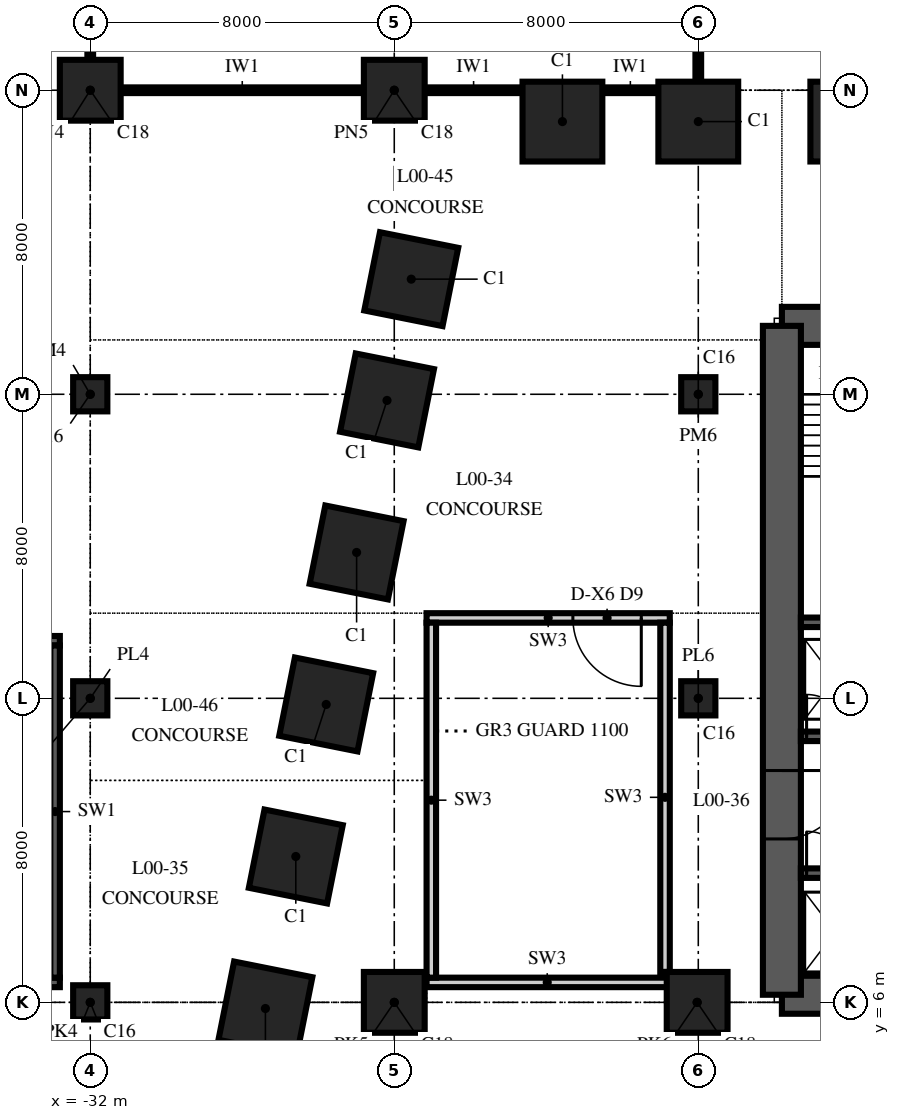
"""IFC4 building model, lengths in metres.
Left out: names, types, materials, properties, quantities, classifications, styles, units other than length and angle.
Written with IfcOpenShell. Run it as: python <this file> out.ifc"""

import sys

from ifc_helpers import new_model, si_unit, direction, frame, frame_2d, origin, origin_2d, place, context, subcontext, project, spatial, polyline, rectangle, outline, extrude, element, fill, save


model = new_model("IFC4")
c1 = context("Model", 3, precision=1e-05, world=origin(), true_north=direction((0.0, 1.0)))
c2 = subcontext(c1, "Body", "Model", "MODEL_VIEW")
j1 = project(units=[si_unit("LENGTHUNIT", "METRE"), si_unit("PLANEANGLEUNIT", "RADIAN")], contexts=[c1])
p1 = place(None, origin())
s1 = spatial("IfcSite", under=j1, at=p1, CompositionType="ELEMENT")
p2 = place(p1, origin())
s2 = spatial("IfcBuilding", under=s1, at=p2, CompositionType="ELEMENT")
p3 = place(p2, origin())
s3 = spatial("IfcBuildingStorey", under=s2, at=p3, CompositionType="ELEMENT", Elevation=0.0)
for number, where, z_axis, x_axis in (
    (1, (-12.0, 29.175, 0.0), (0.0, 0.0, 1.0), (-1.0, 0.0, 0.0)),
    (2, (-16.0, 29.175, 0.0), (0.0, 0.0, 1.0), (-1.0, 0.0, 0.0)),
    (3, (-19.575, 29.175, 0.0), (0.0, 0.0, 1.0), (-1.0, 0.0, 0.0)),
    (4, (-23.553, 25.029, 0.0), (0.0, 0.0, 1.0), (-0.196, -0.981, 0.0)),
    (5, (-24.191, 21.838, 0.0), (0.0, 0.0, 1.0), (-0.196, -0.981, 0.0)),
    (6, (-24.991, 17.838, 0.0), (0.0, 0.0, 1.0), (-0.196, -0.981, 0.0)),
    (7, (-25.791, 13.838, 0.0), (0.0, 0.0, 1.0), (-0.196, -0.981, 0.0)),
    (8, (-26.591, 9.838, 0.0), (0.0, 0.0, 1.0), (-0.196, -0.981, 0.0)),
    (9, (-27.391, 5.838, 0.0), (0.0, 0.0, 1.0), (-0.196, -0.981, 0.0)),
):
    element("IfcColumn", number, at=place(p3, frame(where, z_axis=z_axis, x_axis=x_axis)), inside=s3, PredefinedType="COLUMN", context=c2, shape_type="SweptSolid", body=[
        extrude(rectangle(XDim=2.1, YDim=2.1, at=origin_2d()), origin(), (0.0, 0.0, 1.0), 6.0),
    ])
for number, where, z_axis, x_axis in (
    (10, (-32.0, 6.0, 0.0), (0.0, 0.0, 1.0), (1.0, 0.0, 0.0)),
    (11, (-32.0, 14.0, 0.0), (0.0, 0.0, 1.0), (1.0, 0.0, 0.0)),
    (12, (-32.0, 22.0, 0.0), (0.0, 0.0, 1.0), (1.0, 0.0, 0.0)),
):
    element("IfcColumn", number, at=place(p3, frame(where, z_axis=z_axis, x_axis=x_axis)), inside=s3, PredefinedType="COLUMN", context=c2, shape_type="SweptSolid", body=[
        extrude(rectangle(XDim=0.9, YDim=0.9, at=origin_2d()), origin(), (0.0, 0.0, 1.0), 6.0),
    ])
for number, where, z_axis, x_axis in (
    (13, (-32.0, 30.0, 0.0), (0.0, 0.0, 1.0), (1.0, 0.0, 0.0)),
    (14, (-24.0, 6.0, 0.0), (0.0, 0.0, 1.0), (1.0, 0.0, 0.0)),
    (15, (-24.0, 30.0, 0.0), (0.0, 0.0, 1.0), (1.0, 0.0, 0.0)),
    (16, (-16.03, 6.0, 0.0), (0.0, 0.0, 1.0), (1.0, 0.0, 0.0)),
):
    element("IfcColumn", number, at=place(p3, frame(where, z_axis=z_axis, x_axis=x_axis)), inside=s3, PredefinedType="COLUMN", context=c2, shape_type="SweptSolid", body=[
        extrude(rectangle(XDim=1.6, YDim=1.6, at=origin_2d()), origin(), (0.0, 0.0, 1.0), 6.0),
    ])
for number, where, z_axis, x_axis in (
    (17, (-16.0, 14.0, 0.0), (0.0, 0.0, 1.0), (1.0, 0.0, 0.0)),
    (18, (-16.0, 22.0, 0.0), (0.0, 0.0, 1.0), (1.0, 0.0, 0.0)),
):
    element("IfcColumn", number, at=place(p3, frame(where, z_axis=z_axis, x_axis=x_axis)), inside=s3, PredefinedType="COLUMN", context=c2, shape_type="SweptSolid", body=[
        extrude(rectangle(XDim=0.9, YDim=0.9, at=origin_2d()), origin(), (0.0, 0.0, 1.0), 6.0),
    ])
p4 = place(p3, frame((-13.8, 6.2, 0.0), z_axis=(0.0, 0.0, 1.0), x_axis=(1.0, 0.0, 0.0)))
e19 = element("IfcWall", 19, at=p4, inside=s3, PredefinedType="SHEAR", context=c2, shape_type="SweptSolid", body=[
    extrude(rectangle(XDim=27.6, YDim=1.0, at=frame_2d((13.8, 0.0))), origin(), (0.0, 0.0, 1.0), 6.0),
])
p5 = place(p3, frame((13.8, 23.8, 0.0), z_axis=(0.0, 0.0, 1.0), x_axis=(-1.0, 0.0, 0.0)))
e20 = element("IfcWall", 20, at=p5, inside=s3, PredefinedType="SHEAR", context=c2, shape_type="SweptSolid", body=[
    extrude(rectangle(XDim=27.6, YDim=1.0, at=frame_2d((13.8, 0.0))), origin(), (0.0, 0.0, 1.0), 6.0),
])
p6 = place(p5, frame((21.7, 0.0, 0.0)))
e21 = element("IfcOpeningElement", 21, at=p6, cuts=e20, PredefinedType="OPENING", context=c2, shape_type="SweptSolid", body=[
    extrude(rectangle(XDim=1.0, YDim=2.1, at=frame_2d((0.5, 1.05))), frame((0.0, 0.515, 0.0), z_axis=(0.0, -1.0, 0.0), x_axis=(1.0, 0.0, 0.0)), (0.0, 0.0, 1.0), 1.03),
])
p7 = place(p5, frame((4.9, 0.0, 0.0)))
e22 = element("IfcOpeningElement", 22, at=p7, cuts=e20, PredefinedType="OPENING", context=c2, shape_type="SweptSolid", body=[
    extrude(rectangle(XDim=1.0, YDim=2.1, at=frame_2d((0.5, 1.05))), frame((0.0, 0.515, 0.0), z_axis=(0.0, -1.0, 0.0), x_axis=(1.0, 0.0, 0.0)), (0.0, 0.0, 1.0), 1.03),
])
p8 = place(p5, frame((17.3, 0.0, 0.0)))
e23 = element("IfcOpeningElement", 23, at=p8, cuts=e20, PredefinedType="OPENING", context=c2, shape_type="SweptSolid", body=[
    extrude(rectangle(XDim=1.0, YDim=2.1, at=frame_2d((0.5, 1.05))), frame((0.0, 0.515, 0.0), z_axis=(0.0, -1.0, 0.0), x_axis=(1.0, 0.0, 0.0)), (0.0, 0.0, 1.0), 1.03),
])
p9 = place(p5, frame((13.3, 0.0, 0.0)))
e24 = element("IfcOpeningElement", 24, at=p9, cuts=e20, PredefinedType="OPENING", context=c2, shape_type="SweptSolid", body=[
    extrude(rectangle(XDim=1.0, YDim=2.1, at=frame_2d((0.5, 1.05))), frame((0.0, 0.515, 0.0), z_axis=(0.0, -1.0, 0.0), x_axis=(1.0, 0.0, 0.0)), (0.0, 0.0, 1.0), 1.03),
])
p10 = place(p5, frame((9.3, 0.0, 0.0)))
e25 = element("IfcOpeningElement", 25, at=p10, cuts=e20, PredefinedType="OPENING", context=c2, shape_type="SweptSolid", body=[
    extrude(rectangle(XDim=1.0, YDim=2.1, at=frame_2d((0.5, 1.05))), frame((0.0, 0.515, 0.0), z_axis=(0.0, -1.0, 0.0), x_axis=(1.0, 0.0, 0.0)), (0.0, 0.0, 1.0), 1.03),
])
p11 = place(p3, frame((-13.8, 23.8, 0.0), z_axis=(0.0, 0.0, 1.0), x_axis=(0.0, -1.0, 0.0)))
e26 = element("IfcWall", 26, at=p11, inside=s3, PredefinedType="SHEAR", context=c2, shape_type="SweptSolid", body=[
    extrude(outline(polyline([(0.0, -0.5), (17.6, -0.5), (17.6, 0.0), (17.1, 0.0), (17.1, 0.5), (0.5, 0.5), (0.5, 0.0), (0.0, 0.0), (0.0, -0.5)])), origin(), (0.0, 0.0, 1.0), 6.0),
])
p12 = place(p11, frame((11.7, 0.0, 0.0)))
e27 = element("IfcOpeningElement", 27, at=p12, cuts=e26, PredefinedType="OPENING", context=c2, shape_type="SweptSolid", body=[
    extrude(rectangle(XDim=1.8, YDim=2.4, at=frame_2d((0.9, 1.2))), frame((0.0, 0.515, 0.0), z_axis=(0.0, -1.0, 0.0), x_axis=(1.0, 0.0, 0.0)), (0.0, 0.0, 1.0), 1.03),
])
p13 = place(p3, frame((-13.3, 9.4, 0.0), z_axis=(0.0, 0.0, 1.0), x_axis=(1.0, 0.0, 0.0)))
e28 = element("IfcWall", 28, at=p13, inside=s3, PredefinedType="SHEAR", context=c2, shape_type="SweptSolid", body=[
    extrude(rectangle(XDim=26.6, YDim=0.25, at=frame_2d((13.3, 0.0))), origin(), (0.0, 0.0, 1.0), 6.0),
])
p14 = place(p13, frame((0.15, 0.0, 0.0)))
e29 = element("IfcOpeningElement", 29, at=p14, cuts=e28, PredefinedType="OPENING", context=c2, shape_type="SweptSolid", body=[
    extrude(rectangle(XDim=1.1, YDim=2.1, at=frame_2d((0.55, 1.05))), frame((0.0, 0.14, 0.0), z_axis=(0.0, -1.0, 0.0), x_axis=(1.0, 0.0, 0.0)), (0.0, 0.0, 1.0), 0.28),
])
p15 = place(p13, frame((2.95, 0.0, 0.0)))
e30 = element("IfcOpeningElement", 30, at=p15, cuts=e28, PredefinedType="OPENING", context=c2, shape_type="SweptSolid", body=[
    extrude(rectangle(XDim=1.1, YDim=2.1, at=frame_2d((0.55, 1.05))), frame((0.0, 0.14, 0.0), z_axis=(0.0, -1.0, 0.0), x_axis=(1.0, 0.0, 0.0)), (0.0, 0.0, 1.0), 0.28),
])
p16 = place(p13, frame((5.75, 0.0, 0.0)))
e31 = element("IfcOpeningElement", 31, at=p16, cuts=e28, PredefinedType="OPENING", context=c2, shape_type="SweptSolid", body=[
    extrude(rectangle(XDim=1.1, YDim=2.1, at=frame_2d((0.55, 1.05))), frame((0.0, 0.14, 0.0), z_axis=(0.0, -1.0, 0.0), x_axis=(1.0, 0.0, 0.0)), (0.0, 0.0, 1.0), 0.28),
])
p17 = place(p13, frame((8.55, 0.0, 0.0)))
e32 = element("IfcOpeningElement", 32, at=p17, cuts=e28, PredefinedType="OPENING", context=c2, shape_type="SweptSolid", body=[
    extrude(rectangle(XDim=1.1, YDim=2.1, at=frame_2d((0.55, 1.05))), frame((0.0, 0.14, 0.0), z_axis=(0.0, -1.0, 0.0), x_axis=(1.0, 0.0, 0.0)), (0.0, 0.0, 1.0), 0.28),
])
p18 = place(p13, frame((11.35, 0.0, 0.0)))
e33 = element("IfcOpeningElement", 33, at=p18, cuts=e28, PredefinedType="OPENING", context=c2, shape_type="SweptSolid", body=[
    extrude(rectangle(XDim=1.1, YDim=2.1, at=frame_2d((0.55, 1.05))), frame((0.0, 0.14, 0.0), z_axis=(0.0, -1.0, 0.0), x_axis=(1.0, 0.0, 0.0)), (0.0, 0.0, 1.0), 0.28),
])
p19 = place(p13, frame((14.15, 0.0, 0.0)))
e34 = element("IfcOpeningElement", 34, at=p19, cuts=e28, PredefinedType="OPENING", context=c2, shape_type="SweptSolid", body=[
    extrude(rectangle(XDim=1.1, YDim=2.1, at=frame_2d((0.55, 1.05))), frame((0.0, 0.14, 0.0), z_axis=(0.0, -1.0, 0.0), x_axis=(1.0, 0.0, 0.0)), (0.0, 0.0, 1.0), 0.28),
])
p20 = place(p13, frame((16.95, 0.0, 0.0)))
e35 = element("IfcOpeningElement", 35, at=p20, cuts=e28, PredefinedType="OPENING", context=c2, shape_type="SweptSolid", body=[
    extrude(rectangle(XDim=1.1, YDim=2.1, at=frame_2d((0.55, 1.05))), frame((0.0, 0.14, 0.0), z_axis=(0.0, -1.0, 0.0), x_axis=(1.0, 0.0, 0.0)), (0.0, 0.0, 1.0), 0.28),
])
p21 = place(p13, frame((19.75, 0.0, 0.0)))
e36 = element("IfcOpeningElement", 36, at=p21, cuts=e28, PredefinedType="OPENING", context=c2, shape_type="SweptSolid", body=[
    extrude(rectangle(XDim=1.1, YDim=2.1, at=frame_2d((0.55, 1.05))), frame((0.0, 0.14, 0.0), z_axis=(0.0, -1.0, 0.0), x_axis=(1.0, 0.0, 0.0)), (0.0, 0.0, 1.0), 0.28),
])
p22 = place(p13, frame((22.55, 0.0, 0.0)))
e37 = element("IfcOpeningElement", 37, at=p22, cuts=e28, PredefinedType="OPENING", context=c2, shape_type="SweptSolid", body=[
    extrude(rectangle(XDim=1.1, YDim=2.1, at=frame_2d((0.55, 1.05))), frame((0.0, 0.14, 0.0), z_axis=(0.0, -1.0, 0.0), x_axis=(1.0, 0.0, 0.0)), (0.0, 0.0, 1.0), 0.28),
])
p23 = place(p3, frame((-13.3, 13.0, 0.0), z_axis=(0.0, 0.0, 1.0), x_axis=(1.0, 0.0, 0.0)))
e38 = element("IfcWall", 38, at=p23, inside=s3, PredefinedType="SHEAR", context=c2, shape_type="SweptSolid", body=[
    extrude(rectangle(XDim=26.6, YDim=0.25, at=frame_2d((13.3, 0.0))), origin(), (0.0, 0.0, 1.0), 6.0),
])
p24 = place(p23, frame((0.15, 0.0, 0.0)))
e39 = element("IfcOpeningElement", 39, at=p24, cuts=e38, PredefinedType="OPENING", context=c2, shape_type="SweptSolid", body=[
    extrude(rectangle(XDim=1.1, YDim=2.1, at=frame_2d((0.55, 1.05))), frame((0.0, 0.14, 0.0), z_axis=(0.0, -1.0, 0.0), x_axis=(1.0, 0.0, 0.0)), (0.0, 0.0, 1.0), 0.28),
])
p25 = place(p23, frame((8.55, 0.0, 0.0)))
e40 = element("IfcOpeningElement", 40, at=p25, cuts=e38, PredefinedType="OPENING", context=c2, shape_type="SweptSolid", body=[
    extrude(rectangle(XDim=1.1, YDim=2.1, at=frame_2d((0.55, 1.05))), frame((0.0, 0.14, 0.0), z_axis=(0.0, -1.0, 0.0), x_axis=(1.0, 0.0, 0.0)), (0.0, 0.0, 1.0), 0.28),
])
p26 = place(p23, frame((11.95, 0.0, 0.0)))
e41 = element("IfcOpeningElement", 41, at=p26, cuts=e38, PredefinedType="OPENING", context=c2, shape_type="SweptSolid", body=[
    extrude(rectangle(XDim=1.1, YDim=2.1, at=frame_2d((0.55, 1.05))), frame((0.0, 0.14, 0.0), z_axis=(0.0, -1.0, 0.0), x_axis=(1.0, 0.0, 0.0)), (0.0, 0.0, 1.0), 0.28),
])
p27 = place(p23, frame((15.05, 0.0, 0.0)))
e42 = element("IfcOpeningElement", 42, at=p27, cuts=e38, PredefinedType="OPENING", context=c2, shape_type="SweptSolid", body=[
    extrude(rectangle(XDim=0.9, YDim=2.1, at=frame_2d((0.45, 1.05))), frame((0.0, 0.14, 0.0), z_axis=(0.0, -1.0, 0.0), x_axis=(1.0, 0.0, 0.0)), (0.0, 0.0, 1.0), 0.28),
])
p28 = place(p23, frame((17.45, 0.0, 0.0)))
e43 = element("IfcOpeningElement", 43, at=p28, cuts=e38, PredefinedType="OPENING", context=c2, shape_type="SweptSolid", body=[
    extrude(rectangle(XDim=0.9, YDim=2.1, at=frame_2d((0.45, 1.05))), frame((0.0, 0.14, 0.0), z_axis=(0.0, -1.0, 0.0), x_axis=(1.0, 0.0, 0.0)), (0.0, 0.0, 1.0), 0.28),
])
p29 = place(p23, frame((20.85, 0.0, 0.0)))
e44 = element("IfcOpeningElement", 44, at=p29, cuts=e38, PredefinedType="OPENING", context=c2, shape_type="SweptSolid", body=[
    extrude(rectangle(XDim=0.9, YDim=2.1, at=frame_2d((0.45, 1.05))), frame((0.0, 0.14, 0.0), z_axis=(0.0, -1.0, 0.0), x_axis=(1.0, 0.0, 0.0)), (0.0, 0.0, 1.0), 0.28),
])
p30 = place(p3, frame((-13.3, 16.0, 0.0), z_axis=(0.0, 0.0, 1.0), x_axis=(1.0, 0.0, 0.0)))
e45 = element("IfcWall", 45, at=p30, inside=s3, PredefinedType="SHEAR", context=c2, shape_type="SweptSolid", body=[
    extrude(rectangle(XDim=26.6, YDim=0.25, at=frame_2d((13.3, 0.0))), origin(), (0.0, 0.0, 1.0), 6.0),
])
p31 = place(p3, frame((-23.15, 6.525, 0.0), z_axis=(0.0, 0.0, 1.0), x_axis=(1.0, 0.0, 0.0)))
e46 = element("IfcWall", 46, at=p31, inside=s3, PredefinedType="SOLIDWALL", context=c2, shape_type="SweptSolid", body=[
    extrude(rectangle(XDim=6.35, YDim=0.25, at=frame_2d((3.175, 0.0))), origin(), (0.0, 0.0, 1.0), 5.05),
])
p32 = place(p3, frame((-16.75, 16.115, 0.0), z_axis=(0.0, 0.0, 1.0), x_axis=(-1.0, 0.0, 0.0)))
e47 = element("IfcWall", 47, at=p32, inside=s3, PredefinedType="SOLIDWALL", context=c2, shape_type="SweptSolid", body=[
    extrude(rectangle(XDim=6.4, YDim=0.25, at=frame_2d((3.2, 0.0))), origin(), (0.0, 0.0, 1.0), 6.0),
])
p33 = place(p32, frame((0.75, 0.0, 0.0)))
e48 = element("IfcOpeningElement", 48, at=p33, cuts=e47, PredefinedType="OPENING", context=c2, shape_type="SweptSolid", body=[
    extrude(rectangle(XDim=1.8, YDim=2.1, at=frame_2d((0.9, 1.05))), frame((0.0, 0.14, 0.0), z_axis=(0.0, -1.0, 0.0), x_axis=(1.0, 0.0, 0.0)), (0.0, 0.0, 1.0), 0.28),
])
p34 = place(p3, frame((-23.025, 15.99, 0.0), z_axis=(0.0, 0.0, 1.0), x_axis=(0.0, -1.0, 0.0)))
e49 = element("IfcWall", 49, at=p34, inside=s3, PredefinedType="SOLIDWALL", context=c2, shape_type="SweptSolid", body=[
    extrude(rectangle(XDim=9.34, YDim=0.25, at=frame_2d((4.67, 0.0))), origin(), (0.0, 0.0, 1.0), 6.0),
])
p35 = place(p3, frame((-16.875, 6.8, 0.0), z_axis=(0.0, 0.0, 1.0), x_axis=(0.0, 1.0, 0.0)))
e50 = element("IfcWall", 50, at=p35, inside=s3, PredefinedType="SOLIDWALL", context=c2, shape_type="SweptSolid", body=[
    extrude(rectangle(XDim=9.19, YDim=0.25, at=frame_2d((4.595, 0.0))), origin(), (0.0, 0.0, 1.0), 6.0),
])
p36 = place(p3, frame((-38.6, 6.525, 0.0), z_axis=(0.0, 0.0, 1.0), x_axis=(1.0, 0.0, 0.0)))
e51 = element("IfcWall", 51, at=p36, inside=s3, PredefinedType="SOLIDWALL", context=c2, shape_type="SweptSolid", body=[
    extrude(rectangle(XDim=5.8, YDim=0.25, at=frame_2d((2.9, 0.0))), origin(), (0.0, 0.0, 1.0), 2.75),
])
p37 = place(p3, frame((-32.8, 15.515, 0.0), z_axis=(0.0, 0.0, 1.0), x_axis=(-1.0, 0.0, 0.0)))
e52 = element("IfcWall", 52, at=p37, inside=s3, PredefinedType="SOLIDWALL", context=c2, shape_type="SweptSolid", body=[
    extrude(rectangle(XDim=5.8, YDim=0.25, at=frame_2d((2.9, 0.0))), origin(), (0.0, 0.0, 1.0), 2.75),
])
p38 = place(p37, frame((0.75, 0.0, 0.0)))
e53 = element("IfcOpeningElement", 53, at=p38, cuts=e52, PredefinedType="OPENING", context=c2, shape_type="SweptSolid", body=[
    extrude(rectangle(XDim=1.8, YDim=2.1, at=frame_2d((0.9, 1.05))), frame((0.0, 0.14, 0.0), z_axis=(0.0, -1.0, 0.0), x_axis=(1.0, 0.0, 0.0)), (0.0, 0.0, 1.0), 0.28),
])
p39 = place(p3, frame((-32.925, 6.65, 0.0), z_axis=(0.0, 0.0, 1.0), x_axis=(0.0, 1.0, 0.0)))
e54 = element("IfcWall", 54, at=p39, inside=s3, PredefinedType="SOLIDWALL", context=c2, shape_type="SweptSolid", body=[
    extrude(rectangle(XDim=8.74, YDim=0.25, at=frame_2d((4.37, 0.0))), origin(), (0.0, 0.0, 1.0), 2.75),
])
p40 = place(p3, frame((-32.0, 30.81, 0.0), z_axis=(0.0, 0.0, 1.0), x_axis=(0.0, 1.0, 0.0)))
e55 = element("IfcWall", 55, at=p40, inside=s3, PredefinedType="PARTITIONING", context=c2, shape_type="SweptSolid", body=[
    extrude(rectangle(XDim=6.73, YDim=0.15, at=frame_2d((3.365, 0.0))), origin(), (0.0, 0.0, 1.0), 5.05),
])
p41 = place(p40, frame((2.865, 0.0, 0.0)))
e56 = element("IfcOpeningElement", 56, at=p41, cuts=e55, PredefinedType="OPENING", context=c2, shape_type="SweptSolid", body=[
    extrude(rectangle(XDim=1.0, YDim=2.1, at=frame_2d((0.5, 1.05))), frame((0.0, 0.09, 0.0), z_axis=(0.0, -1.0, 0.0), x_axis=(1.0, 0.0, 0.0)), (0.0, 0.0, 1.0), 0.18),
])
p42 = place(p3, frame((-16.0, 30.235, 0.0), z_axis=(0.0, 0.0, 1.0), x_axis=(0.0, 1.0, 0.0)))
e57 = element("IfcWall", 57, at=p42, inside=s3, PredefinedType="PARTITIONING", context=c2, shape_type="SweptSolid", body=[
    extrude(rectangle(XDim=7.305, YDim=0.15, at=frame_2d((3.652, 0.0))), origin(), (0.0, 0.0, 1.0), 5.7),
])
p43 = place(p3, frame((-31.19, 30.0, 0.0), z_axis=(0.0, 0.0, 1.0), x_axis=(1.0, 0.0, 0.0)))
e58 = element("IfcWall", 58, at=p43, inside=s3, PredefinedType="PARTITIONING", context=c2, shape_type="SweptSolid", body=[
    extrude(rectangle(XDim=6.38, YDim=0.15, at=frame_2d((3.19, 0.0))), origin(), (0.0, 0.0, 1.0), 5.05),
])
p44 = place(p3, frame((-23.19, 30.0, 0.0), z_axis=(0.0, 0.0, 1.0), x_axis=(1.0, 0.0, 0.0)))
e59 = element("IfcWall", 59, at=p44, inside=s3, PredefinedType="PARTITIONING", context=c2, shape_type="SweptSolid", body=[
    extrude(rectangle(XDim=2.555, YDim=0.15, at=frame_2d((1.277, 0.0))), origin(), (0.0, 0.0, 1.0), 5.7),
])
p45 = place(p3, frame((-18.515, 30.0, 0.0), z_axis=(0.0, 0.0, 1.0), x_axis=(1.0, 0.0, 0.0)))
e60 = element("IfcWall", 60, at=p45, inside=s3, PredefinedType="PARTITIONING", context=c2, shape_type="SweptSolid", body=[
    extrude(rectangle(XDim=1.455, YDim=0.15, at=frame_2d((0.728, 0.0))), origin(), (0.0, 0.0, 1.0), 5.7),
])
p46 = place(p12, origin())
e61 = element("IfcDoor", 61, at=p46, inside=s3, OperationType="DOUBLE_DOOR_SINGLE_SWING", PredefinedType="DOOR", context=c2, shape_type="SweptSolid", body=[
    extrude(rectangle(XDim=1.8, YDim=2.4, at=frame_2d((0.9, 1.2))), frame((0.0, 0.5, 0.0), z_axis=(0.0, -1.0, 0.0), x_axis=(1.0, 0.0, 0.0)), (0.0, 0.0, 1.0), 1.0),
])
fill(e27, e61)
p47 = place(p14, origin())
e62 = element("IfcDoor", 62, at=p47, inside=s3, OperationType="SLIDING_TO_LEFT", PredefinedType="DOOR", context=c2, shape_type="SweptSolid", body=[
    extrude(rectangle(XDim=1.1, YDim=2.1, at=frame_2d((0.55, 1.05))), frame((0.0, 0.125, 0.0), z_axis=(0.0, -1.0, 0.0), x_axis=(1.0, 0.0, 0.0)), (0.0, 0.0, 1.0), 0.25),
])
fill(e29, e62)
p48 = place(p24, origin())
e63 = element("IfcDoor", 63, at=p48, inside=s3, OperationType="SLIDING_TO_LEFT", PredefinedType="DOOR", context=c2, shape_type="SweptSolid", body=[
    extrude(rectangle(XDim=1.1, YDim=2.1, at=frame_2d((0.55, 1.05))), frame((0.0, 0.125, 0.0), z_axis=(0.0, -1.0, 0.0), x_axis=(1.0, 0.0, 0.0)), (0.0, 0.0, 1.0), 0.25),
])
fill(e39, e63)
p49 = place(p33, origin())
e64 = element("IfcDoor", 64, at=p49, inside=s3, OperationType="DOUBLE_DOOR_SINGLE_SWING", PredefinedType="DOOR", context=c2, shape_type="SweptSolid", body=[
    extrude(rectangle(XDim=1.8, YDim=2.1, at=frame_2d((0.9, 1.05))), frame((0.0, 0.125, 0.0), z_axis=(0.0, -1.0, 0.0), x_axis=(1.0, 0.0, 0.0)), (0.0, 0.0, 1.0), 0.25),
])
fill(e48, e64)
save(model, sys.argv[1])
